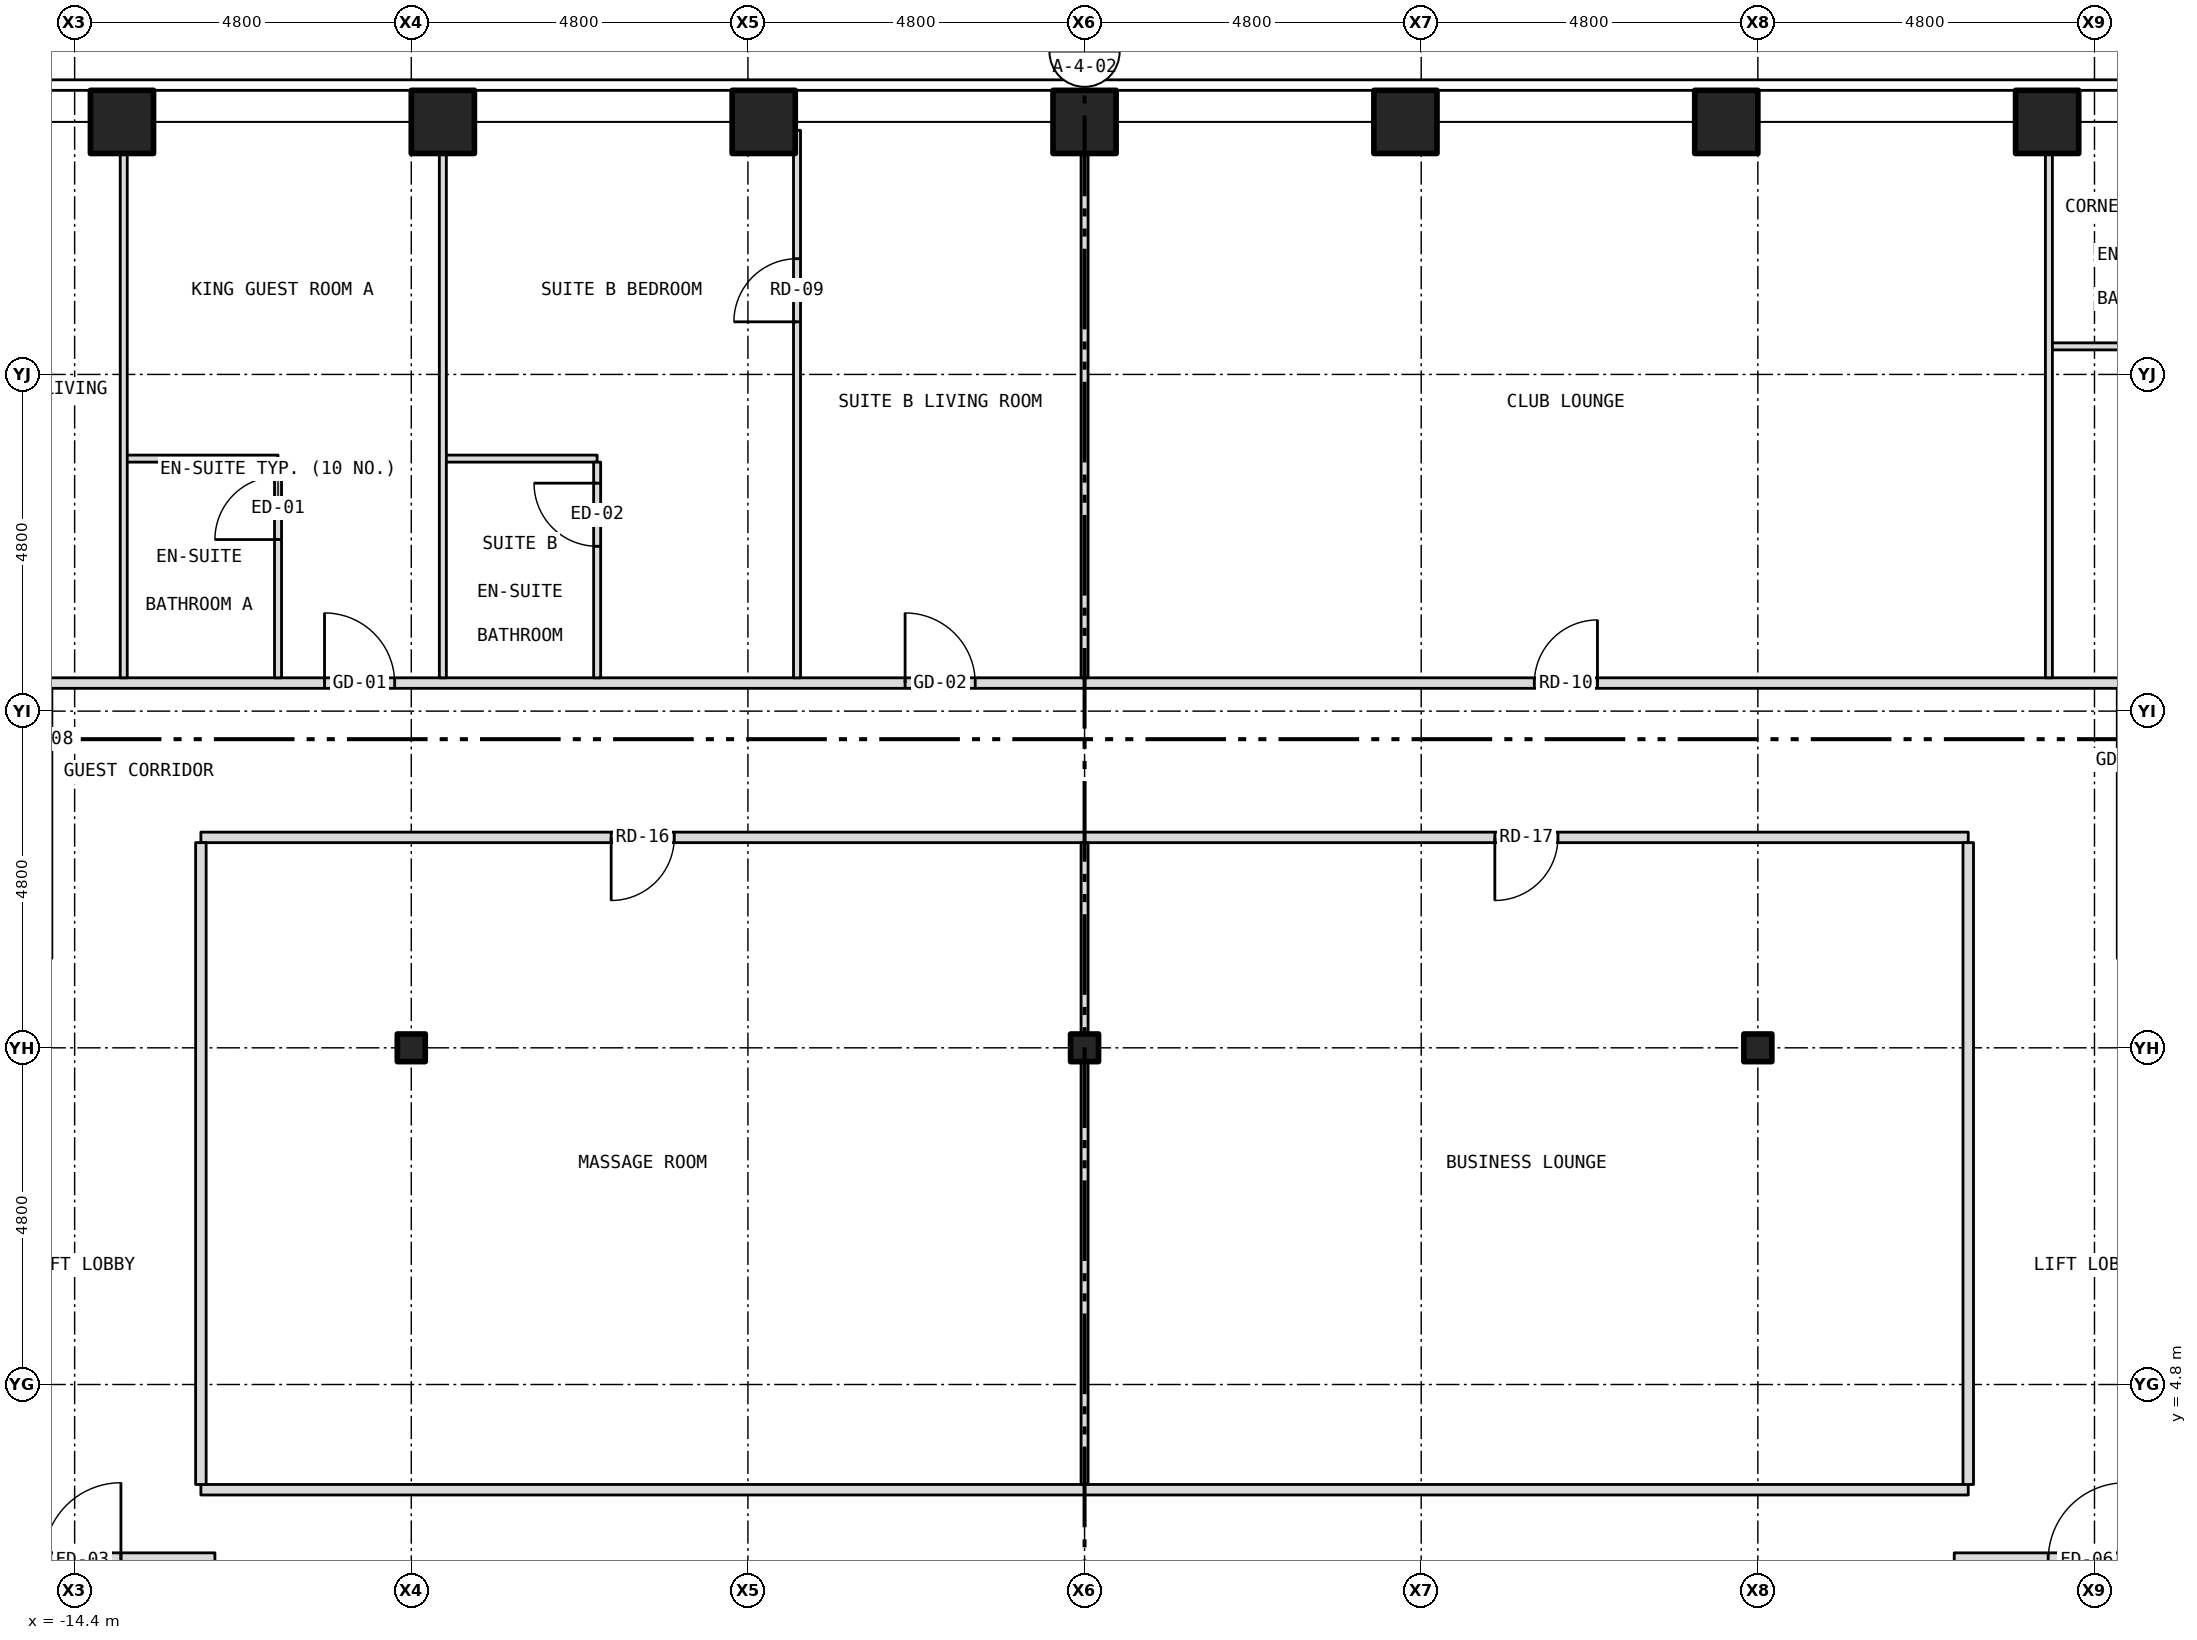
"""IFC4 building model, lengths in metres.
Left out: names, types, materials, properties, quantities, classifications, styles, units other than length and angle.
Written with IfcOpenShell. Run it as: python <this file> out.ifc"""

import sys

from ifc_helpers import new_model, si_unit, direction, frame, frame_2d, origin, origin_2d, place, context, subcontext, project, spatial, rectangle, hollow_rectangle, i_section, extrude, element, fill, save


model = new_model("IFC4")
c1 = context("Model", 3, precision=1e-05, world=origin(), true_north=direction((0.0, 1.0)))
c2 = subcontext(c1, "Body", "Model", "MODEL_VIEW")
j1 = project(units=[si_unit("LENGTHUNIT", "METRE"), si_unit("PLANEANGLEUNIT", "RADIAN")], contexts=[c1])
p1 = place(None, origin())
s1 = spatial("IfcSite", under=j1, at=p1, CompositionType="ELEMENT")
p2 = place(p1, origin())
s2 = spatial("IfcBuilding", under=s1, at=p2, CompositionType="ELEMENT")
p3 = place(p2, frame((0.0, 0.0, 103.0)))
s3 = spatial("IfcBuildingStorey", under=s2, at=p3, CompositionType="ELEMENT", Elevation=103.0)
for number, where, z_axis, x_axis in (
    (1, (-13.725, 22.8, -0.15), (0.0, 0.0, 1.0), (1.0, 0.0, 0.0)),
    (2, (-9.15, 22.8, -0.15), (0.0, 0.0, 1.0), (1.0, 0.0, 0.0)),
    (3, (-4.575, 22.8, -0.15), (0.0, 0.0, 1.0), (1.0, 0.0, 0.0)),
    (4, (0.0, 22.8, -0.15), (0.0, 0.0, 1.0), (1.0, 0.0, 0.0)),
    (5, (4.575, 22.8, -0.15), (0.0, 0.0, 1.0), (1.0, 0.0, 0.0)),
    (6, (9.15, 22.8, -0.15), (0.0, 0.0, 1.0), (1.0, 0.0, 0.0)),
    (7, (13.725, 22.8, -0.15), (0.0, 0.0, 1.0), (1.0, 0.0, 0.0)),
):
    element("IfcColumn", number, at=place(p3, frame(where, z_axis=z_axis, x_axis=x_axis)), inside=s3, PredefinedType="COLUMN", context=c2, shape_type="SweptSolid", body=[
        extrude(hollow_rectangle(XDim=0.9, YDim=0.9, WallThickness=0.05, at=origin_2d()), origin(), (0.0, 0.0, 1.0), 3.5),
    ])
for number, where, z_axis, x_axis in (
    (8, (-9.6, 9.6, -0.15), (0.0, 0.0, 1.0), (1.0, 0.0, 0.0)),
    (9, (0.0, 9.6, -0.15), (0.0, 0.0, 1.0), (1.0, 0.0, 0.0)),
    (10, (9.6, 9.6, -0.15), (0.0, 0.0, 1.0), (1.0, 0.0, 0.0)),
):
    element("IfcColumn", number, at=place(p3, frame(where, z_axis=z_axis, x_axis=x_axis)), inside=s3, PredefinedType="COLUMN", context=c2, shape_type="SweptSolid", body=[
        extrude(i_section(OverallWidth=0.399, OverallDepth=0.394, WebThickness=0.023, FlangeThickness=0.037, at=origin_2d()), origin(), (0.0, 0.0, 1.0), 3.5),
    ])
p4 = place(p3, frame((-15.68, 2.3, 0.0), z_axis=(0.0, 0.0, 1.0), x_axis=(1.0, 0.0, 0.0)))
e11 = element("IfcWall", 11, at=p4, inside=s3, PredefinedType="PARTITIONING", context=c2, shape_type="SweptSolid", body=[
    extrude(rectangle(XDim=3.28, YDim=0.2, at=frame_2d((1.64, 0.0))), origin(), (0.0, 0.0, 1.0), 3.35),
])
p5 = place(p4, frame((0.84, 0.0, 0.0)))
e12 = element("IfcOpeningElement", 12, at=p5, cuts=e11, PredefinedType="OPENING", context=c2, shape_type="SweptSolid", body=[
    extrude(rectangle(XDim=1.1, YDim=2.1, at=frame_2d((0.55, 1.05))), frame((0.0, 0.112, 0.0), z_axis=(0.0, -1.0, 0.0), x_axis=(1.0, 0.0, 0.0)), (0.0, 0.0, 1.0), 0.224),
])
p6 = place(p3, frame((12.4, 2.3, 0.0), z_axis=(0.0, 0.0, 1.0), x_axis=(1.0, 0.0, 0.0)))
e13 = element("IfcWall", 13, at=p6, inside=s3, PredefinedType="PARTITIONING", context=c2, shape_type="SweptSolid", body=[
    extrude(rectangle(XDim=3.28, YDim=0.2, at=frame_2d((1.64, 0.0))), origin(), (0.0, 0.0, 1.0), 3.35),
])
p7 = place(p6, frame((1.34, 0.0, 0.0)))
e14 = element("IfcOpeningElement", 14, at=p7, cuts=e13, PredefinedType="OPENING", context=c2, shape_type="SweptSolid", body=[
    extrude(rectangle(XDim=1.1, YDim=2.1, at=frame_2d((0.55, 1.05))), frame((0.0, 0.112, 0.0), z_axis=(0.0, -1.0, 0.0), x_axis=(1.0, 0.0, 0.0)), (0.0, 0.0, 1.0), 0.224),
])
p8 = place(p3, frame((-12.6, 3.3, 0.0), z_axis=(0.0, 0.0, 1.0), x_axis=(1.0, 0.0, 0.0)))
e15 = element("IfcWall", 15, at=p8, inside=s3, PredefinedType="PARTITIONING", context=c2, shape_type="SweptSolid", body=[
    extrude(rectangle(XDim=25.2, YDim=0.15, at=frame_2d((12.6, 0.0))), origin(), (0.0, 0.0, 1.0), 3.35),
])
p9 = place(p3, frame((-12.6, 12.6, 0.0), z_axis=(0.0, 0.0, 1.0), x_axis=(1.0, 0.0, 0.0)))
e16 = element("IfcWall", 16, at=p9, inside=s3, PredefinedType="PARTITIONING", context=c2, shape_type="SweptSolid", body=[
    extrude(rectangle(XDim=25.2, YDim=0.15, at=frame_2d((12.6, 0.0))), origin(), (0.0, 0.0, 1.0), 3.35),
])
p10 = place(p9, frame((5.85, 0.0, 0.0)))
e17 = element("IfcOpeningElement", 17, at=p10, cuts=e16, PredefinedType="OPENING", context=c2, shape_type="SweptSolid", body=[
    extrude(rectangle(XDim=0.9, YDim=2.1, at=frame_2d((0.45, 1.05))), frame((0.0, 0.087, 0.0), z_axis=(0.0, -1.0, 0.0), x_axis=(1.0, 0.0, 0.0)), (0.0, 0.0, 1.0), 0.174),
])
p11 = place(p9, frame((18.45, 0.0, 0.0)))
e18 = element("IfcOpeningElement", 18, at=p11, cuts=e16, PredefinedType="OPENING", context=c2, shape_type="SweptSolid", body=[
    extrude(rectangle(XDim=0.9, YDim=2.1, at=frame_2d((0.45, 1.05))), frame((0.0, 0.087, 0.0), z_axis=(0.0, -1.0, 0.0), x_axis=(1.0, 0.0, 0.0)), (0.0, 0.0, 1.0), 0.174),
])
p12 = place(p3, frame((-14.8, 14.8, 0.0), z_axis=(0.0, 0.0, 1.0), x_axis=(1.0, 0.0, 0.0)))
e19 = element("IfcWall", 19, at=p12, inside=s3, PredefinedType="PARTITIONING", context=c2, shape_type="SweptSolid", body=[
    extrude(rectangle(XDim=29.6, YDim=0.15, at=frame_2d((14.8, 0.0))), origin(), (0.0, 0.0, 1.0), 3.35),
])
p13 = place(p12, frame((3.963, 0.0, 0.0)))
e20 = element("IfcOpeningElement", 20, at=p13, cuts=e19, PredefinedType="OPENING", context=c2, shape_type="SweptSolid", body=[
    extrude(rectangle(XDim=1.0, YDim=2.1, at=frame_2d((0.5, 1.05))), frame((0.0, 0.087, 0.0), z_axis=(0.0, -1.0, 0.0), x_axis=(1.0, 0.0, 0.0)), (0.0, 0.0, 1.0), 0.174),
])
p14 = place(p12, frame((12.241, 0.0, 0.0)))
e21 = element("IfcOpeningElement", 21, at=p14, cuts=e19, PredefinedType="OPENING", context=c2, shape_type="SweptSolid", body=[
    extrude(rectangle(XDim=1.0, YDim=2.1, at=frame_2d((0.5, 1.05))), frame((0.0, 0.087, 0.0), z_axis=(0.0, -1.0, 0.0), x_axis=(1.0, 0.0, 0.0)), (0.0, 0.0, 1.0), 0.174),
])
p15 = place(p12, frame((21.213, 0.0, 0.0)))
e22 = element("IfcOpeningElement", 22, at=p15, cuts=e19, PredefinedType="OPENING", context=c2, shape_type="SweptSolid", body=[
    extrude(rectangle(XDim=0.9, YDim=2.1, at=frame_2d((0.45, 1.05))), frame((0.0, 0.087, 0.0), z_axis=(0.0, -1.0, 0.0), x_axis=(1.0, 0.0, 0.0)), (0.0, 0.0, 1.0), 0.174),
])
for number, where, z_axis, x_axis in (
    (23, (-13.7, 18.0, 0.0), (0.0, 0.0, 1.0), (1.0, 0.0, 0.0)),
    (24, (-9.15, 18.0, 0.0), (0.0, 0.0, 1.0), (1.0, 0.0, 0.0)),
):
    element("IfcWall", number, at=place(p3, frame(where, z_axis=z_axis, x_axis=x_axis)), inside=s3, PredefinedType="PARTITIONING", context=c2, shape_type="SweptSolid", body=[
        extrude(rectangle(XDim=2.2, YDim=0.1, at=frame_2d((1.1, 0.0))), origin(), (0.0, 0.0, 1.0), 3.35),
    ])
p16 = place(p3, frame((13.75, 19.6, 0.0), z_axis=(0.0, 0.0, 1.0), x_axis=(1.0, 0.0, 0.0)))
e25 = element("IfcWall", 25, at=p16, inside=s3, PredefinedType="PARTITIONING", context=c2, shape_type="SweptSolid", body=[
    extrude(rectangle(XDim=2.65, YDim=0.1, at=frame_2d((1.325, 0.0))), origin(), (0.0, 0.0, 1.0), 3.35),
])
p17 = place(p3, frame((-13.7, 14.875, 0.0), z_axis=(0.0, 0.0, 1.0), x_axis=(0.0, 1.0, 0.0)))
e26 = element("IfcWall", 26, at=p17, inside=s3, PredefinedType="PARTITIONING", context=c2, shape_type="SweptSolid", body=[
    extrude(rectangle(XDim=7.805, YDim=0.1, at=frame_2d((3.902, 0.0))), origin(), (0.0, 0.0, 1.0), 3.35),
])
p18 = place(p3, frame((-12.6, 3.375, 0.0), z_axis=(0.0, 0.0, 1.0), x_axis=(0.0, 1.0, 0.0)))
e27 = element("IfcWall", 27, at=p18, inside=s3, PredefinedType="PARTITIONING", context=c2, shape_type="SweptSolid", body=[
    extrude(rectangle(XDim=9.15, YDim=0.15, at=frame_2d((4.575, 0.0))), origin(), (0.0, 0.0, 1.0), 3.35),
])
p19 = place(p3, frame((-11.5, 14.875, 0.0), z_axis=(0.0, 0.0, 1.0), x_axis=(0.0, 1.0, 0.0)))
e28 = element("IfcWall", 28, at=p19, inside=s3, PredefinedType="PARTITIONING", context=c2, shape_type="SweptSolid", body=[
    extrude(rectangle(XDim=3.075, YDim=0.1, at=frame_2d((1.538, 0.0))), origin(), (0.0, 0.0, 1.0), 3.35),
])
p20 = place(p19, frame((1.971, 0.0, 0.0)))
e29 = element("IfcOpeningElement", 29, at=p20, cuts=e28, PredefinedType="OPENING", context=c2, shape_type="SweptSolid", body=[
    extrude(rectangle(XDim=0.9, YDim=2.1, at=frame_2d((0.45, 1.05))), frame((0.0, 0.062, 0.0), z_axis=(0.0, -1.0, 0.0), x_axis=(1.0, 0.0, 0.0)), (0.0, 0.0, 1.0), 0.124),
])
p21 = place(p3, frame((-9.15, 14.875, 0.0), z_axis=(0.0, 0.0, 1.0), x_axis=(0.0, 1.0, 0.0)))
e30 = element("IfcWall", 30, at=p21, inside=s3, PredefinedType="PARTITIONING", context=c2, shape_type="SweptSolid", body=[
    extrude(rectangle(XDim=7.805, YDim=0.1, at=frame_2d((3.902, 0.0))), origin(), (0.0, 0.0, 1.0), 3.35),
])
p22 = place(p3, frame((-6.95, 14.875, 0.0), z_axis=(0.0, 0.0, 1.0), x_axis=(0.0, 1.0, 0.0)))
e31 = element("IfcWall", 31, at=p22, inside=s3, PredefinedType="PARTITIONING", context=c2, shape_type="SweptSolid", body=[
    extrude(rectangle(XDim=3.075, YDim=0.1, at=frame_2d((1.538, 0.0))), origin(), (0.0, 0.0, 1.0), 3.35),
])
p23 = place(p22, frame((1.875, 0.0, 0.0)))
e32 = element("IfcOpeningElement", 32, at=p23, cuts=e31, PredefinedType="OPENING", context=c2, shape_type="SweptSolid", body=[
    extrude(rectangle(XDim=0.9, YDim=2.1, at=frame_2d((0.45, 1.05))), frame((0.0, 0.062, 0.0), z_axis=(0.0, -1.0, 0.0), x_axis=(1.0, 0.0, 0.0)), (0.0, 0.0, 1.0), 0.124),
])
p24 = place(p3, frame((-4.1, 14.875, 0.0), z_axis=(0.0, 0.0, 1.0), x_axis=(0.0, 1.0, 0.0)))
e33 = element("IfcWall", 33, at=p24, inside=s3, PredefinedType="PARTITIONING", context=c2, shape_type="SweptSolid", body=[
    extrude(rectangle(XDim=7.805, YDim=0.1, at=frame_2d((3.902, 0.0))), origin(), (0.0, 0.0, 1.0), 3.35),
])
p25 = place(p24, frame((5.075, 0.0, 0.0)))
e34 = element("IfcOpeningElement", 34, at=p25, cuts=e33, PredefinedType="OPENING", context=c2, shape_type="SweptSolid", body=[
    extrude(rectangle(XDim=0.9, YDim=2.1, at=frame_2d((0.45, 1.05))), frame((0.0, 0.062, 0.0), z_axis=(0.0, -1.0, 0.0), x_axis=(1.0, 0.0, 0.0)), (0.0, 0.0, 1.0), 0.124),
])
p26 = place(p3, frame((0.0, 3.375, 0.0), z_axis=(0.0, 0.0, 1.0), x_axis=(0.0, 1.0, 0.0)))
e35 = element("IfcWall", 35, at=p26, inside=s3, PredefinedType="PARTITIONING", context=c2, shape_type="SweptSolid", body=[
    extrude(rectangle(XDim=6.026, YDim=0.1, at=frame_2d((3.013, 0.0))), origin(), (0.0, 0.0, 1.0), 2.728),
])
p27 = place(p3, frame((0.0, 9.401, 0.0), z_axis=(0.0, 0.0, 1.0), x_axis=(0.0, 1.0, 0.0)))
e36 = element("IfcWall", 36, at=p27, inside=s3, PredefinedType="PARTITIONING", context=c2, shape_type="SweptSolid", body=[
    extrude(rectangle(XDim=0.398, YDim=0.1, at=frame_2d((0.199, 0.0))), origin(), (0.0, 0.0, 1.0), 3.35),
])
p28 = place(p3, frame((0.0, 9.799, 0.0), z_axis=(0.0, 0.0, 1.0), x_axis=(0.0, 1.0, 0.0)))
e37 = element("IfcWall", 37, at=p28, inside=s3, PredefinedType="PARTITIONING", context=c2, shape_type="SweptSolid", body=[
    extrude(rectangle(XDim=2.726, YDim=0.1, at=frame_2d((1.363, 0.0))), origin(), (0.0, 0.0, 1.0), 2.728),
])
p29 = place(p3, frame((0.0, 14.875, 0.0), z_axis=(0.0, 0.0, 1.0), x_axis=(0.0, 1.0, 0.0)))
e38 = element("IfcWall", 38, at=p29, inside=s3, PredefinedType="PARTITIONING", context=c2, shape_type="SweptSolid", body=[
    extrude(rectangle(XDim=7.475, YDim=0.1, at=frame_2d((3.738, 0.0))), origin(), (0.0, 0.0, 1.0), 2.728),
])
p30 = place(p3, frame((0.0, 22.35, 0.0), z_axis=(0.0, 0.0, 1.0), x_axis=(0.0, 1.0, 0.0)))
e39 = element("IfcWall", 39, at=p30, inside=s3, PredefinedType="PARTITIONING", context=c2, shape_type="SweptSolid", body=[
    extrude(rectangle(XDim=0.33, YDim=0.1, at=frame_2d((0.165, 0.0))), origin(), (0.0, 0.0, 1.0), 3.35),
])
p31 = place(p3, frame((12.6, 3.375, 0.0), z_axis=(0.0, 0.0, 1.0), x_axis=(0.0, 1.0, 0.0)))
e40 = element("IfcWall", 40, at=p31, inside=s3, PredefinedType="PARTITIONING", context=c2, shape_type="SweptSolid", body=[
    extrude(rectangle(XDim=9.15, YDim=0.15, at=frame_2d((4.575, 0.0))), origin(), (0.0, 0.0, 1.0), 3.35),
])
p32 = place(p3, frame((13.75, 14.875, 0.0), z_axis=(0.0, 0.0, 1.0), x_axis=(0.0, 1.0, 0.0)))
e41 = element("IfcWall", 41, at=p32, inside=s3, PredefinedType="PARTITIONING", context=c2, shape_type="SweptSolid", body=[
    extrude(rectangle(XDim=7.805, YDim=0.1, at=frame_2d((3.902, 0.0))), origin(), (0.0, 0.0, 1.0), 3.35),
])
p33 = place(p5, origin())
e42 = element("IfcDoor", 42, at=p33, inside=s3, OperationType="SINGLE_SWING_RIGHT", PredefinedType="DOOR", context=c2, shape_type="SweptSolid", body=[
    extrude(rectangle(XDim=1.1, YDim=2.1, at=frame_2d((0.55, 1.05))), frame((0.0, 0.025, 0.0), z_axis=(0.0, -1.0, 0.0), x_axis=(1.0, 0.0, 0.0)), (0.0, 0.0, 1.0), 0.05),
])
fill(e12, e42)
p34 = place(p7, origin())
e43 = element("IfcDoor", 43, at=p34, inside=s3, OperationType="SINGLE_SWING_RIGHT", PredefinedType="DOOR", context=c2, shape_type="SweptSolid", body=[
    extrude(rectangle(XDim=1.1, YDim=2.1, at=frame_2d((0.55, 1.05))), frame((0.0, 0.025, 0.0), z_axis=(0.0, -1.0, 0.0), x_axis=(1.0, 0.0, 0.0)), (0.0, 0.0, 1.0), 0.05),
])
fill(e14, e43)
p35 = place(p13, origin())
e44 = element("IfcDoor", 44, at=p35, inside=s3, OperationType="SINGLE_SWING_LEFT", PredefinedType="DOOR", context=c2, shape_type="SweptSolid", body=[
    extrude(rectangle(XDim=1.0, YDim=2.1, at=frame_2d((0.5, 1.05))), frame((0.0, 0.025, 0.0), z_axis=(0.0, -1.0, 0.0), x_axis=(1.0, 0.0, 0.0)), (0.0, 0.0, 1.0), 0.05),
])
fill(e20, e44)
p36 = place(p20, origin())
e45 = element("IfcDoor", 45, at=p36, inside=s3, OperationType="SINGLE_SWING_LEFT", PredefinedType="DOOR", context=c2, shape_type="SweptSolid", body=[
    extrude(rectangle(XDim=0.9, YDim=2.1, at=frame_2d((0.45, 1.05))), frame((0.0, 0.025, 0.0), z_axis=(0.0, -1.0, 0.0), x_axis=(1.0, 0.0, 0.0)), (0.0, 0.0, 1.0), 0.05),
])
fill(e29, e45)
p37 = place(p14, origin())
e46 = element("IfcDoor", 46, at=p37, inside=s3, OperationType="SINGLE_SWING_LEFT", PredefinedType="DOOR", context=c2, shape_type="SweptSolid", body=[
    extrude(rectangle(XDim=1.0, YDim=2.1, at=frame_2d((0.5, 1.05))), frame((0.0, 0.025, 0.0), z_axis=(0.0, -1.0, 0.0), x_axis=(1.0, 0.0, 0.0)), (0.0, 0.0, 1.0), 0.05),
])
fill(e21, e46)
p38 = place(p25, origin())
e47 = element("IfcDoor", 47, at=p38, inside=s3, OperationType="SINGLE_SWING_LEFT", PredefinedType="DOOR", context=c2, shape_type="SweptSolid", body=[
    extrude(rectangle(XDim=0.9, YDim=2.1, at=frame_2d((0.45, 1.05))), frame((0.0, 0.025, 0.0), z_axis=(0.0, -1.0, 0.0), x_axis=(1.0, 0.0, 0.0)), (0.0, 0.0, 1.0), 0.05),
])
fill(e34, e47)
p39 = place(p23, origin())
e48 = element("IfcDoor", 48, at=p39, inside=s3, OperationType="SINGLE_SWING_RIGHT", PredefinedType="DOOR", context=c2, shape_type="SweptSolid", body=[
    extrude(rectangle(XDim=0.9, YDim=2.1, at=frame_2d((0.45, 1.05))), frame((0.0, 0.025, 0.0), z_axis=(0.0, -1.0, 0.0), x_axis=(1.0, 0.0, 0.0)), (0.0, 0.0, 1.0), 0.05),
])
fill(e32, e48)
p40 = place(p15, origin())
e49 = element("IfcDoor", 49, at=p40, inside=s3, OperationType="SINGLE_SWING_RIGHT", PredefinedType="DOOR", context=c2, shape_type="SweptSolid", body=[
    extrude(rectangle(XDim=0.9, YDim=2.1, at=frame_2d((0.45, 1.05))), frame((0.0, 0.025, 0.0), z_axis=(0.0, -1.0, 0.0), x_axis=(1.0, 0.0, 0.0)), (0.0, 0.0, 1.0), 0.05),
])
fill(e22, e49)
p41 = place(p10, origin())
e50 = element("IfcDoor", 50, at=p41, inside=s3, OperationType="SINGLE_SWING_LEFT", PredefinedType="DOOR", context=c2, shape_type="SweptSolid", body=[
    extrude(rectangle(XDim=0.9, YDim=2.1, at=frame_2d((0.45, 1.05))), frame((0.0, 0.025, 0.0), z_axis=(0.0, -1.0, 0.0), x_axis=(1.0, 0.0, 0.0)), (0.0, 0.0, 1.0), 0.05),
])
fill(e17, e50)
p42 = place(p11, origin())
e51 = element("IfcDoor", 51, at=p42, inside=s3, OperationType="SINGLE_SWING_LEFT", PredefinedType="DOOR", context=c2, shape_type="SweptSolid", body=[
    extrude(rectangle(XDim=0.9, YDim=2.1, at=frame_2d((0.45, 1.05))), frame((0.0, 0.025, 0.0), z_axis=(0.0, -1.0, 0.0), x_axis=(1.0, 0.0, 0.0)), (0.0, 0.0, 1.0), 0.05),
])
fill(e18, e51)
save(model, sys.argv[1])
